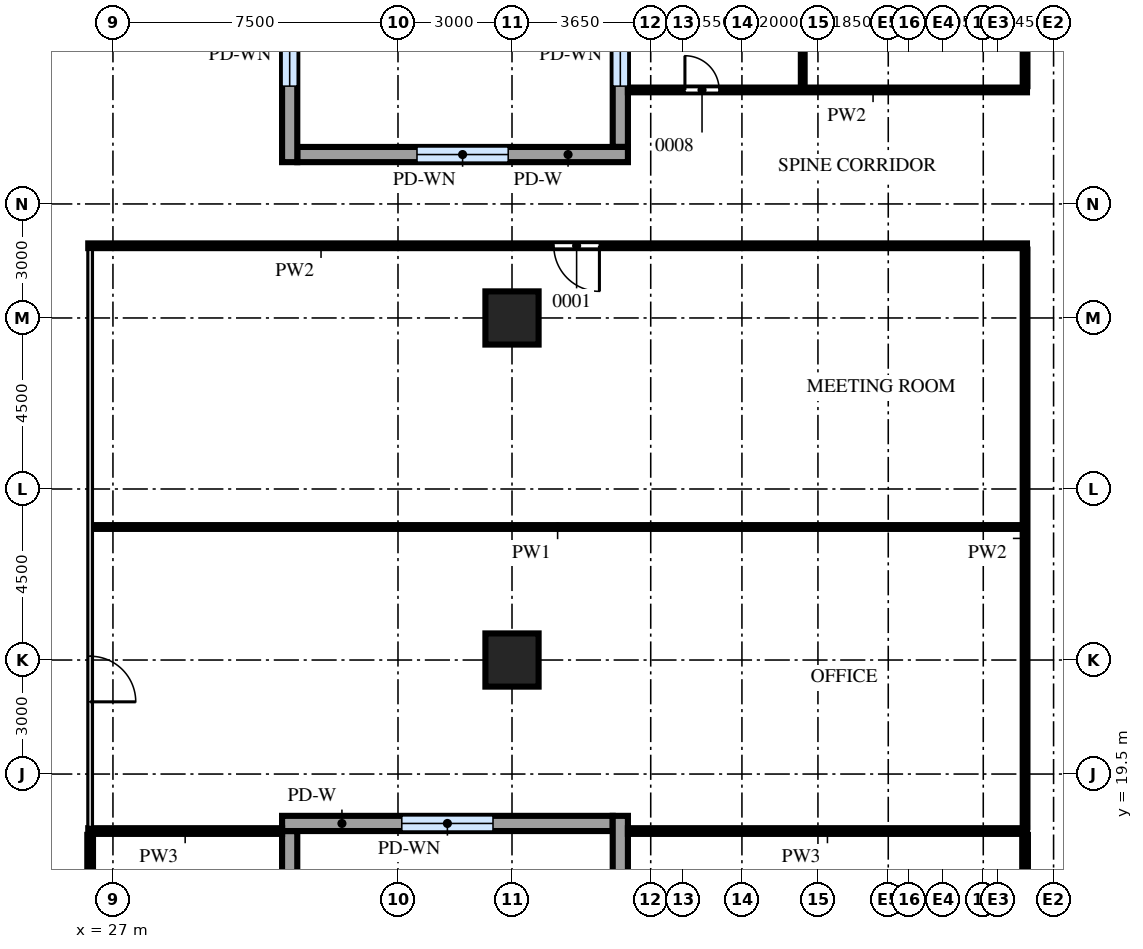
"""IFC4 building model, lengths in metres.
Left out: names, types, materials, properties, quantities, classifications, styles, units other than length and angle.
Written with IfcOpenShell. Run it as: python <this file> out.ifc"""

import sys

from ifc_helpers import new_model, si_unit, direction, frame, frame_2d, origin, origin_2d, place, context, subcontext, project, spatial, rectangle, extrude, source, transform, mapped, element, fill, save


model = new_model("IFC4")
c1 = context("Model", 3, precision=1e-05, world=origin(), true_north=direction((0.0, 1.0)))
c2 = subcontext(c1, "Body", "Model", "MODEL_VIEW")
j1 = project(units=[si_unit("LENGTHUNIT", "METRE"), si_unit("PLANEANGLEUNIT", "RADIAN")], contexts=[c1])
p1 = place(None, origin())
s1 = spatial("IfcSite", under=j1, at=p1, CompositionType="ELEMENT")
p2 = place(p1, origin())
s2 = spatial("IfcBuilding", under=s1, at=p2, CompositionType="ELEMENT")
p3 = place(p2, frame((0.0, 0.0, 28.5)))
s3 = spatial("IfcBuildingStorey", under=s2, at=p3, CompositionType="ELEMENT", Elevation=28.5)
m1 = source(origin(), c2, "Body", "SweptSolid", [
    extrude(rectangle(XDim=1.4, YDim=1.4, at=origin_2d()), origin(), (0.0, 0.0, 1.0), 4.0),
])
for number, where, z_axis, x_axis in (
    (1, (37.5, 22.5, 0.0), (0.0, 0.0, 1.0), (1.0, 0.0, 0.0)),
    (2, (37.5, 31.5, 0.0), (0.0, 0.0, 1.0), (1.0, 0.0, 0.0)),
):
    element("IfcColumn", number, at=place(p3, frame(where, z_axis=z_axis, x_axis=x_axis)), inside=s3, PredefinedType="COLUMN", context=c2, shape_type="MappedRepresentation", body=[
        mapped(m1, transform((0.0, 0.0, 0.0))),
    ])
m2 = source(origin(), c2, "Body", "SweptSolid", [
    extrude(rectangle(XDim=17.6, YDim=0.4, at=frame_2d((8.8, 0.0))), origin(), (0.0, 0.0, 1.0), 4.2),
])
p4 = place(p3, frame((31.65, 0.4, 0.0), z_axis=(0.0, 0.0, 1.0), x_axis=(0.0, 1.0, 0.0)))
e3 = element("IfcWall", 3, at=p4, inside=s3, PredefinedType="SOLIDWALL", context=c2, shape_type="MappedRepresentation", body=[
    mapped(m2, transform((0.0, 0.0, 0.0))),
])
m3 = source(origin(), c2, "Body", "SweptSolid", [
    extrude(rectangle(XDim=2.4, YDim=2.4, at=frame_2d((1.2, 1.2))), frame((0.0, 0.21, 0.0), z_axis=(0.0, -1.0, 0.0), x_axis=(1.0, 0.0, 0.0)), (0.0, 0.0, 1.0), 0.42),
])
p5 = place(p4, frame((1.6, 0.0, 1.0)))
e4 = element("IfcOpeningElement", 4, at=p5, cuts=e3, PredefinedType="OPENING", context=c2, shape_type="MappedRepresentation", body=[
    mapped(m3, transform((0.0, 0.0, 0.0))),
])
p6 = place(p4, frame((7.6, 0.0, 1.0)))
e5 = element("IfcOpeningElement", 5, at=p6, cuts=e3, PredefinedType="OPENING", context=c2, shape_type="MappedRepresentation", body=[
    mapped(m3, transform((0.0, 0.0, 0.0))),
])
p7 = place(p4, frame((13.6, 0.0, 1.0)))
e6 = element("IfcOpeningElement", 6, at=p7, cuts=e3, PredefinedType="OPENING", context=c2, shape_type="MappedRepresentation", body=[
    mapped(m3, transform((0.0, 0.0, 0.0))),
])
m4 = source(origin(), c2, "Body", "SweptSolid", [
    extrude(rectangle(XDim=8.7, YDim=0.4, at=frame_2d((4.35, 0.0))), origin(), (0.0, 0.0, 1.0), 4.2),
])
p8 = place(p3, frame((31.45, 18.2, 0.0), z_axis=(0.0, 0.0, 1.0), x_axis=(1.0, 0.0, 0.0)))
e7 = element("IfcWall", 7, at=p8, inside=s3, PredefinedType="SOLIDWALL", context=c2, shape_type="MappedRepresentation", body=[
    mapped(m4, transform((0.0, 0.0, 0.0))),
])
p9 = place(p8, frame((3.15, 0.0, 1.0)))
e8 = element("IfcOpeningElement", 8, at=p9, cuts=e7, PredefinedType="OPENING", context=c2, shape_type="MappedRepresentation", body=[
    mapped(m3, transform((0.0, 0.0, 0.0))),
])
m5 = source(origin(), c2, "Body", "SweptSolid", [
    extrude(rectangle(XDim=18.4, YDim=0.4, at=frame_2d((9.2, 0.0))), origin(), (0.0, 0.0, 1.0), 4.2),
])
p10 = place(p3, frame((40.35, 18.4, 0.0), z_axis=(0.0, 0.0, 1.0), x_axis=(0.0, -1.0, 0.0)))
e9 = element("IfcWall", 9, at=p10, inside=s3, PredefinedType="SOLIDWALL", context=c2, shape_type="MappedRepresentation", body=[
    mapped(m5, transform((0.0, 0.0, 0.0))),
])
p11 = place(p10, frame((2.0, 0.0, 1.0)))
e10 = element("IfcOpeningElement", 10, at=p11, cuts=e9, PredefinedType="OPENING", context=c2, shape_type="MappedRepresentation", body=[
    mapped(m3, transform((0.0, 0.0, 0.0))),
])
p12 = place(p10, frame((8.0, 0.0, 1.0)))
e11 = element("IfcOpeningElement", 11, at=p12, cuts=e9, PredefinedType="OPENING", context=c2, shape_type="MappedRepresentation", body=[
    mapped(m3, transform((0.0, 0.0, 0.0))),
])
p13 = place(p10, frame((14.0, 0.0, 1.0)))
e12 = element("IfcOpeningElement", 12, at=p13, cuts=e9, PredefinedType="OPENING", context=c2, shape_type="MappedRepresentation", body=[
    mapped(m3, transform((0.0, 0.0, 0.0))),
])
p14 = place(p3, frame((40.35, 53.6, 0.0), z_axis=(0.0, 0.0, 1.0), x_axis=(0.0, -1.0, 0.0)))
e13 = element("IfcWall", 13, at=p14, inside=s3, PredefinedType="SOLIDWALL", context=c2, shape_type="MappedRepresentation", body=[
    mapped(m2, transform((0.0, 0.0, 0.0))),
])
p15 = place(p14, frame((1.6, 0.0, 1.0)))
e14 = element("IfcOpeningElement", 14, at=p15, cuts=e13, PredefinedType="OPENING", context=c2, shape_type="MappedRepresentation", body=[
    mapped(m3, transform((0.0, 0.0, 0.0))),
])
p16 = place(p14, frame((7.6, 0.0, 1.0)))
e15 = element("IfcOpeningElement", 15, at=p16, cuts=e13, PredefinedType="OPENING", context=c2, shape_type="MappedRepresentation", body=[
    mapped(m3, transform((0.0, 0.0, 0.0))),
])
p17 = place(p14, frame((13.6, 0.0, 1.0)))
e16 = element("IfcOpeningElement", 16, at=p17, cuts=e13, PredefinedType="OPENING", context=c2, shape_type="MappedRepresentation", body=[
    mapped(m3, transform((0.0, 0.0, 0.0))),
])
p18 = place(p3, frame((40.55, 35.8, 0.0), z_axis=(0.0, 0.0, 1.0), x_axis=(-1.0, 0.0, 0.0)))
e17 = element("IfcWall", 17, at=p18, inside=s3, PredefinedType="SOLIDWALL", context=c2, shape_type="MappedRepresentation", body=[
    mapped(m4, transform((0.0, 0.0, 0.0))),
])
p19 = place(p18, frame((3.15, 0.0, 1.0)))
e18 = element("IfcOpeningElement", 18, at=p19, cuts=e17, PredefinedType="OPENING", context=c2, shape_type="MappedRepresentation", body=[
    mapped(m3, transform((0.0, 0.0, 0.0))),
])
p20 = place(p3, frame((31.65, 35.6, 0.0), z_axis=(0.0, 0.0, 1.0), x_axis=(0.0, 1.0, 0.0)))
e19 = element("IfcWall", 19, at=p20, inside=s3, PredefinedType="SOLIDWALL", context=c2, shape_type="MappedRepresentation", body=[
    mapped(m5, transform((0.0, 0.0, 0.0))),
])
p21 = place(p20, frame((2.0, 0.0, 1.0)))
e20 = element("IfcOpeningElement", 20, at=p21, cuts=e19, PredefinedType="OPENING", context=c2, shape_type="MappedRepresentation", body=[
    mapped(m3, transform((0.0, 0.0, 0.0))),
])
p22 = place(p20, frame((8.0, 0.0, 1.0)))
e21 = element("IfcOpeningElement", 21, at=p22, cuts=e19, PredefinedType="OPENING", context=c2, shape_type="MappedRepresentation", body=[
    mapped(m3, transform((0.0, 0.0, 0.0))),
])
p23 = place(p20, frame((14.0, 0.0, 1.0)))
e22 = element("IfcOpeningElement", 22, at=p23, cuts=e19, PredefinedType="OPENING", context=c2, shape_type="MappedRepresentation", body=[
    mapped(m3, transform((0.0, 0.0, 0.0))),
])
m6 = source(origin(), c2, "Body", "SweptSolid", [
    extrude(rectangle(XDim=17.5, YDim=0.15, at=frame_2d((8.75, 0.0))), origin(), (0.0, 0.0, 1.0), 4.0),
])
p24 = place(p3, frame((26.4, 0.4, 0.0), z_axis=(0.0, 0.0, 1.0), x_axis=(0.0, 1.0, 0.0)))
e23 = element("IfcWall", 23, at=p24, inside=s3, PredefinedType="PARTITIONING", context=c2, shape_type="MappedRepresentation", body=[
    mapped(m6, transform((0.0, 0.0, 0.0))),
])
m7 = source(origin(), c2, "Body", "SweptSolid", [
    extrude(rectangle(XDim=0.9, YDim=2.1, at=frame_2d((0.45, 1.05))), frame((0.0, 0.085, 0.0), z_axis=(0.0, -1.0, 0.0), x_axis=(1.0, 0.0, 0.0)), (0.0, 0.0, 1.0), 0.17),
])
p25 = place(p24, frame((11.05, 0.0, 0.0)))
e24 = element("IfcOpeningElement", 24, at=p25, cuts=e23, PredefinedType="OPENING", context=c2, shape_type="MappedRepresentation", body=[
    mapped(m7, transform((0.0, 0.0, 0.0))),
])
p26 = place(p3, frame((51.0, 0.4, 0.0), z_axis=(0.0, 0.0, 1.0), x_axis=(0.0, 1.0, 0.0)))
e25 = element("IfcWall", 25, at=p26, inside=s3, PredefinedType="PARTITIONING", context=c2, shape_type="MappedRepresentation", body=[
    mapped(m6, transform((0.0, 0.0, 0.0))),
])
m8 = source(origin(), c2, "Body", "SweptSolid", [
    extrude(rectangle(XDim=1.2, YDim=2.1, at=frame_2d((0.6, 1.05))), frame((0.0, 0.085, 0.0), z_axis=(0.0, -1.0, 0.0), x_axis=(1.0, 0.0, 0.0)), (0.0, 0.0, 1.0), 0.17),
])
p27 = place(p26, frame((9.75, 0.0, 0.0)))
e26 = element("IfcOpeningElement", 26, at=p27, cuts=e25, PredefinedType="OPENING", context=c2, shape_type="MappedRepresentation", body=[
    mapped(m8, transform((0.0, 0.0, 0.0))),
])
m9 = source(origin(), c2, "Body", "SweptSolid", [
    extrude(rectangle(XDim=5.1, YDim=0.15, at=frame_2d((2.55, 0.0))), origin(), (0.0, 0.0, 1.0), 4.0),
])
p28 = place(p3, frame((26.35, 18.0, 0.0), z_axis=(0.0, 0.0, 1.0), x_axis=(1.0, 0.0, 0.0)))
e27 = element("IfcWall", 27, at=p28, inside=s3, PredefinedType="PARTITIONING", context=c2, shape_type="MappedRepresentation", body=[
    mapped(m9, transform((0.0, 0.0, 0.0))),
])
m10 = source(origin(), c2, "Body", "SweptSolid", [
    extrude(rectangle(XDim=10.5, YDim=0.15, at=frame_2d((5.25, 0.0))), origin(), (0.0, 0.0, 1.0), 4.0),
])
p29 = place(p3, frame((40.55, 18.0, 0.0), z_axis=(0.0, 0.0, 1.0), x_axis=(1.0, 0.0, 0.0)))
e28 = element("IfcWall", 28, at=p29, inside=s3, PredefinedType="PARTITIONING", context=c2, shape_type="MappedRepresentation", body=[
    mapped(m10, transform((0.0, 0.0, 0.0))),
])
m11 = source(origin(), c2, "Body", "SweptSolid", [
    extrude(rectangle(XDim=15.2, YDim=0.125, at=frame_2d((7.6, 0.0))), origin(), (0.0, 0.0, 1.0), 4.0),
])
p30 = place(p3, frame((26.4, 18.1, 0.0), z_axis=(0.0, 0.0, 1.0), x_axis=(0.0, 1.0, 0.0)))
e29 = element("IfcWall", 29, at=p30, inside=s3, PredefinedType="PARTITIONING", context=c2, shape_type="MappedRepresentation", body=[
    mapped(m11, transform((0.0, 0.0, 0.0))),
])
m12 = source(origin(), c2, "Body", "SweptSolid", [
    extrude(rectangle(XDim=1.2, YDim=2.1, at=frame_2d((0.6, 1.05))), frame((0.0, 0.073, 0.0), z_axis=(0.0, -1.0, 0.0), x_axis=(1.0, 0.0, 0.0)), (0.0, 0.0, 1.0), 0.145),
])
p31 = place(p30, frame((3.3, 0.0, 0.0)))
e30 = element("IfcOpeningElement", 30, at=p31, cuts=e29, PredefinedType="OPENING", context=c2, shape_type="MappedRepresentation", body=[
    mapped(m12, transform((0.0, 0.0, 0.0))),
])
p32 = place(p3, frame((51.0, 18.1, 0.0), z_axis=(0.0, 0.0, 1.0), x_axis=(0.0, 1.0, 0.0)))
e31 = element("IfcWall", 31, at=p32, inside=s3, PredefinedType="PARTITIONING", context=c2, shape_type="MappedRepresentation", body=[
    mapped(m11, transform((0.0, 0.0, 0.0))),
])
m13 = source(origin(), c2, "Body", "SweptSolid", [
    extrude(rectangle(XDim=24.4, YDim=0.1, at=frame_2d((12.2, 0.0))), origin(), (0.0, 0.0, 1.0), 4.0),
])
p33 = place(p3, frame((26.5, 26.0, 0.0), z_axis=(0.0, 0.0, 1.0), x_axis=(1.0, 0.0, 0.0)))
e32 = element("IfcWall", 32, at=p33, inside=s3, PredefinedType="PARTITIONING", context=c2, shape_type="MappedRepresentation", body=[
    mapped(m13, transform((0.0, 0.0, 0.0))),
])
m14 = source(origin(), c2, "Body", "SweptSolid", [
    extrude(rectangle(XDim=24.7, YDim=0.125, at=frame_2d((12.35, 0.0))), origin(), (0.0, 0.0, 1.0), 4.0),
])
p34 = place(p3, frame((26.35, 33.4, 0.0), z_axis=(0.0, 0.0, 1.0), x_axis=(1.0, 0.0, 0.0)))
e33 = element("IfcWall", 33, at=p34, inside=s3, PredefinedType="PARTITIONING", context=c2, shape_type="MappedRepresentation", body=[
    mapped(m14, transform((0.0, 0.0, 0.0))),
])
p35 = place(p34, frame((12.25, 0.0, 0.0)))
e34 = element("IfcOpeningElement", 34, at=p35, cuts=e33, PredefinedType="OPENING", context=c2, shape_type="MappedRepresentation", body=[
    mapped(m12, transform((0.0, 0.0, 0.0))),
])
m15 = source(origin(), c2, "Body", "SweptSolid", [
    extrude(rectangle(XDim=10.5, YDim=0.125, at=frame_2d((5.25, 0.0))), origin(), (0.0, 0.0, 1.0), 4.0),
])
p36 = place(p3, frame((40.55, 37.5, 0.0), z_axis=(0.0, 0.0, 1.0), x_axis=(1.0, 0.0, 0.0)))
e35 = element("IfcWall", 35, at=p36, inside=s3, PredefinedType="PARTITIONING", context=c2, shape_type="MappedRepresentation", body=[
    mapped(m15, transform((0.0, 0.0, 0.0))),
])
m16 = source(origin(), c2, "Body", "SweptSolid", [
    extrude(rectangle(XDim=0.9, YDim=2.1, at=frame_2d((0.45, 1.05))), frame((0.0, 0.073, 0.0), z_axis=(0.0, -1.0, 0.0), x_axis=(1.0, 0.0, 0.0)), (0.0, 0.0, 1.0), 0.145),
])
p37 = place(p36, frame((1.5, 0.0, 0.0)))
e36 = element("IfcOpeningElement", 36, at=p37, cuts=e35, PredefinedType="OPENING", context=c2, shape_type="MappedRepresentation", body=[
    mapped(m16, transform((0.0, 0.0, 0.0))),
])
m17 = source(origin(), c2, "Body", "SweptSolid", [
    extrude(rectangle(XDim=16.0, YDim=0.1, at=frame_2d((8.0, 0.0))), origin(), (0.0, 0.0, 1.0), 4.0),
])
p38 = place(p3, frame((45.15, 37.6, 0.0), z_axis=(0.0, 0.0, 1.0), x_axis=(0.0, 1.0, 0.0)))
e37 = element("IfcWall", 37, at=p38, inside=s3, PredefinedType="PARTITIONING", context=c2, shape_type="MappedRepresentation", body=[
    mapped(m17, transform((0.0, 0.0, 0.0))),
])
m18 = source(origin(), c2, "Body", "SweptSolid", [
    extrude(rectangle(XDim=12.9, YDim=0.125, at=frame_2d((6.45, 0.0))), origin(), (0.0, 0.0, 1.0), 4.0),
])
p39 = place(p3, frame((51.0, 37.6, 0.0), z_axis=(0.0, 0.0, 1.0), x_axis=(0.0, 1.0, 0.0)))
e38 = element("IfcWall", 38, at=p39, inside=s3, PredefinedType="PARTITIONING", context=c2, shape_type="MappedRepresentation", body=[
    mapped(m18, transform((0.0, 0.0, 0.0))),
])
p40 = place(p39, frame((5.85, 0.0, 0.0)))
e39 = element("IfcOpeningElement", 39, at=p40, cuts=e38, PredefinedType="OPENING", context=c2, shape_type="MappedRepresentation", body=[
    mapped(m16, transform((0.0, 0.0, 0.0))),
])
m19 = source(origin(), c2, "Body", "SweptSolid", [
    extrude(rectangle(XDim=2.4, YDim=2.4, at=frame_2d((1.2, 1.2))), frame((0.0, 0.03, 0.0), z_axis=(0.0, -1.0, 0.0), x_axis=(1.0, 0.0, 0.0)), (0.0, 0.0, 1.0), 0.06),
])
p41 = place(p9, origin())
e40 = element("IfcWindow", 40, at=p41, inside=s3, PartitioningType="SINGLE_PANEL", PredefinedType="WINDOW", context=c2, shape_type="MappedRepresentation", body=[
    mapped(m19, transform((0.0, 0.0, 0.0))),
])
fill(e8, e40)
p42 = place(p17, origin())
e41 = element("IfcWindow", 41, at=p42, inside=s3, PartitioningType="SINGLE_PANEL", PredefinedType="WINDOW", context=c2, shape_type="MappedRepresentation", body=[
    mapped(m19, transform((0.0, 0.0, 0.0))),
])
fill(e16, e41)
p43 = place(p19, origin())
e42 = element("IfcWindow", 42, at=p43, inside=s3, PartitioningType="SINGLE_PANEL", PredefinedType="WINDOW", context=c2, shape_type="MappedRepresentation", body=[
    mapped(m19, transform((0.0, 0.0, 0.0))),
])
fill(e18, e42)
p44 = place(p21, origin())
e43 = element("IfcWindow", 43, at=p44, inside=s3, PartitioningType="SINGLE_PANEL", PredefinedType="WINDOW", context=c2, shape_type="MappedRepresentation", body=[
    mapped(m19, transform((0.0, 0.0, 0.0))),
])
fill(e20, e43)
m20 = source(origin(), c2, "Body", "SweptSolid", [
    extrude(rectangle(XDim=1.2, YDim=2.1, at=frame_2d((0.6, 1.05))), frame((0.0, 0.025, 0.0), z_axis=(0.0, -1.0, 0.0), x_axis=(1.0, 0.0, 0.0)), (0.0, 0.0, 1.0), 0.05),
])
p45 = place(p31, origin())
e44 = element("IfcDoor", 44, at=p45, inside=s3, OperationType="SINGLE_SWING_LEFT", PredefinedType="DOOR", context=c2, shape_type="MappedRepresentation", body=[
    mapped(m20, transform((0.0, 0.0, 0.0))),
])
fill(e30, e44)
p46 = place(p35, origin())
e45 = element("IfcDoor", 45, at=p46, inside=s3, OperationType="SINGLE_SWING_RIGHT", PredefinedType="DOOR", context=c2, shape_type="MappedRepresentation", body=[
    mapped(m20, transform((0.0, 0.0, 0.0))),
])
fill(e34, e45)
m21 = source(origin(), c2, "Body", "SweptSolid", [
    extrude(rectangle(XDim=0.9, YDim=2.1, at=frame_2d((0.45, 1.05))), frame((0.0, 0.025, 0.0), z_axis=(0.0, -1.0, 0.0), x_axis=(1.0, 0.0, 0.0)), (0.0, 0.0, 1.0), 0.05),
])
p47 = place(p37, origin())
e46 = element("IfcDoor", 46, at=p47, inside=s3, OperationType="SINGLE_SWING_RIGHT", PredefinedType="DOOR", context=c2, shape_type="MappedRepresentation", body=[
    mapped(m21, transform((0.0, 0.0, 0.0))),
])
fill(e36, e46)
save(model, sys.argv[1])
